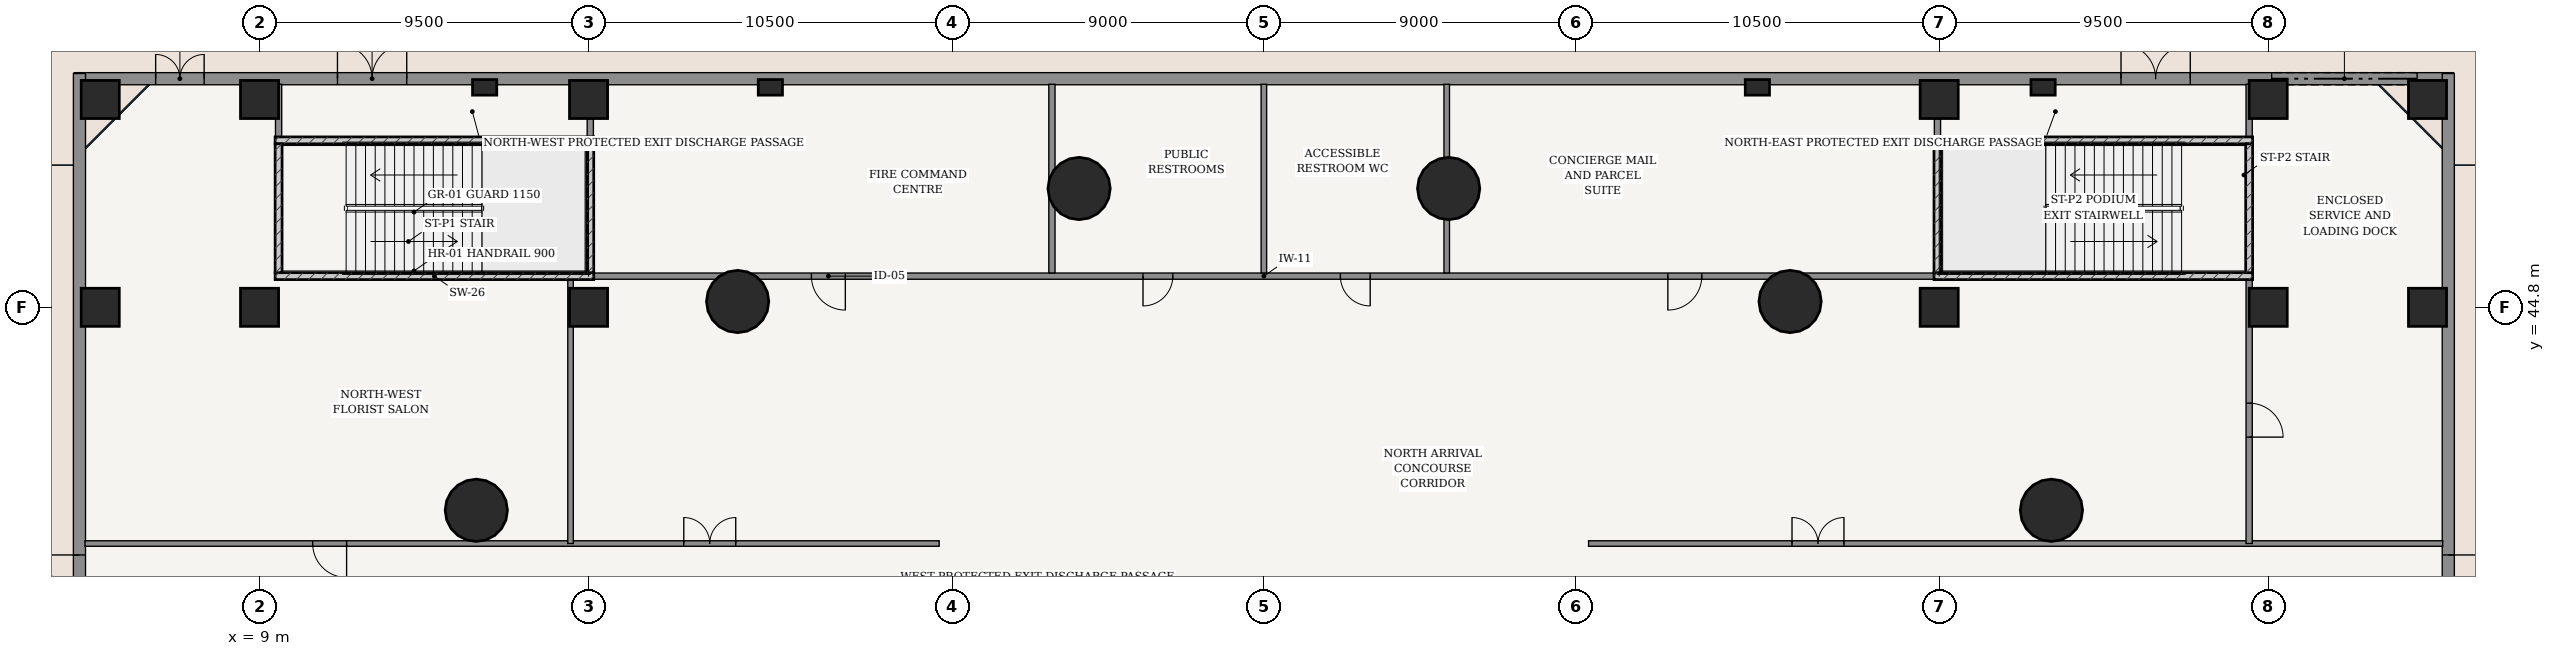
"""IFC4 building model, lengths in metres.
Left out: names, types, materials, properties, quantities, classifications, styles, units other than length and angle.
Written with IfcOpenShell. Run it as: python <this file> out.ifc"""

import sys

from ifc_helpers import new_model, si_unit, direction, frame, frame_2d, origin, origin_2d, place, context, subcontext, project, spatial, rectangle, hollow_circle, extrude, source, transform, mapped, element, fill, save


model = new_model("IFC4")
c1 = context("Model", 3, precision=1e-05, world=origin(), true_north=direction((-0.2419218956, 0.970295726276)))
c2 = subcontext(c1, "Body", "Model", "MODEL_VIEW")
j1 = project(units=[si_unit("LENGTHUNIT", "METRE"), si_unit("PLANEANGLEUNIT", "RADIAN")], contexts=[c1])
p1 = place(None, origin())
s1 = spatial("IfcSite", under=j1, at=p1, CompositionType="ELEMENT")
p2 = place(p1, origin())
s2 = spatial("IfcBuilding", under=s1, at=p2, CompositionType="ELEMENT")
p3 = place(p2, origin())
s3 = spatial("IfcBuildingStorey", under=s2, at=p3, CompositionType="ELEMENT", Elevation=0.0)
for number, where, z_axis, x_axis in (
    (1, (9.45, 45.7, 0.0), (0.0, 0.0, 1.0), (1.0, 0.0, 0.0)),
    (2, (9.45, 49.62, 0.0), (0.0, 0.0, 1.0), (1.0, 0.0, 0.0)),
):
    element("IfcWall", number, at=place(p3, frame(where, z_axis=z_axis, x_axis=x_axis)), inside=s3, PredefinedType="SOLIDWALL", context=c2, shape_type="SweptSolid", body=[
        extrude(rectangle(XDim=9.2, YDim=0.2, at=frame_2d((4.6, 0.0))), origin(), (0.0, 0.0, 1.0), 5.1),
    ])
for number, where, z_axis, x_axis in (
    (3, (9.55, 45.8, 0.0), (0.0, 0.0, 1.0), (0.0, 1.0, 0.0)),
    (4, (18.55, 45.8, 0.0), (0.0, 0.0, 1.0), (0.0, 1.0, 0.0)),
):
    element("IfcWall", number, at=place(p3, frame(where, z_axis=z_axis, x_axis=x_axis)), inside=s3, PredefinedType="SOLIDWALL", context=c2, shape_type="SweptSolid", body=[
        extrude(rectangle(XDim=3.72, YDim=0.2, at=frame_2d((1.86, 0.0))), origin(), (0.0, 0.0, 1.0), 5.1),
    ])
for number, where, z_axis, x_axis in (
    (5, (57.35, 45.7, 0.0), (0.0, 0.0, 1.0), (1.0, 0.0, 0.0)),
    (6, (57.35, 49.62, 0.0), (0.0, 0.0, 1.0), (1.0, 0.0, 0.0)),
):
    element("IfcWall", number, at=place(p3, frame(where, z_axis=z_axis, x_axis=x_axis)), inside=s3, PredefinedType="SOLIDWALL", context=c2, shape_type="SweptSolid", body=[
        extrude(rectangle(XDim=9.2, YDim=0.2, at=frame_2d((4.6, 0.0))), origin(), (0.0, 0.0, 1.0), 5.1),
    ])
for number, where, z_axis, x_axis in (
    (7, (57.45, 45.8, 0.0), (0.0, 0.0, 1.0), (0.0, 1.0, 0.0)),
    (8, (66.45, 45.8, 0.0), (0.0, 0.0, 1.0), (0.0, 1.0, 0.0)),
):
    element("IfcWall", number, at=place(p3, frame(where, z_axis=z_axis, x_axis=x_axis)), inside=s3, PredefinedType="SOLIDWALL", context=c2, shape_type="SweptSolid", body=[
        extrude(rectangle(XDim=3.72, YDim=0.2, at=frame_2d((1.86, 0.0))), origin(), (0.0, 0.0, 1.0), 5.1),
    ])
for number, where, z_axis, x_axis in (
    (9, (60.741, 38.939, 0.0), (0.0, 0.0, 1.0), (1.0, 0.0, 0.0)),
    (10, (53.195, 44.968, 0.0), (0.0, 0.0, 1.0), (1.0, 0.0, 0.0)),
    (11, (43.336, 48.23, 0.0), (0.0, 0.0, 1.0), (1.0, 0.0, 0.0)),
    (12, (32.664, 48.23, 0.0), (0.0, 0.0, 1.0), (1.0, 0.0, 0.0)),
    (13, (22.805, 44.968, 0.0), (0.0, 0.0, 1.0), (1.0, 0.0, 0.0)),
    (14, (15.259, 38.939, 0.0), (0.0, 0.0, 1.0), (1.0, 0.0, 0.0)),
):
    element("IfcColumn", number, at=place(p3, frame(where, z_axis=z_axis, x_axis=x_axis)), inside=s3, PredefinedType="COLUMN", context=c2, shape_type="SweptSolid", body=[
        extrude(hollow_circle(Radius=0.9, WallThickness=0.055, at=origin_2d()), origin(), (0.0, 0.0, 1.0), 5.4),
    ])
for number, where, z_axis, x_axis in (
    (15, (4.4, 44.8, 0.0), (0.0, 0.0, 1.0), (1.0, 0.0, 0.0)),
    (16, (4.4, 50.8, 0.0), (0.0, 0.0, 1.0), (1.0, 0.0, 0.0)),
    (17, (9.0, 44.8, 0.0), (0.0, 0.0, 1.0), (1.0, 0.0, 0.0)),
    (18, (9.0, 50.8, 0.0), (0.0, 0.0, 1.0), (1.0, 0.0, 0.0)),
    (19, (18.5, 44.8, 0.0), (0.0, 0.0, 1.0), (1.0, 0.0, 0.0)),
    (20, (18.5, 50.8, 0.0), (0.0, 0.0, 1.0), (1.0, 0.0, 0.0)),
    (21, (57.5, 44.8, 0.0), (0.0, 0.0, 1.0), (1.0, 0.0, 0.0)),
    (22, (57.5, 50.8, 0.0), (0.0, 0.0, 1.0), (1.0, 0.0, 0.0)),
    (23, (67.0, 44.8, 0.0), (0.0, 0.0, 1.0), (1.0, 0.0, 0.0)),
    (24, (67.0, 50.8, 0.0), (0.0, 0.0, 1.0), (1.0, 0.0, 0.0)),
    (25, (71.6, 44.8, 0.0), (0.0, 0.0, 1.0), (1.0, 0.0, 0.0)),
    (26, (71.6, 50.8, 0.0), (0.0, 0.0, 1.0), (1.0, 0.0, 0.0)),
):
    element("IfcColumn", number, at=place(p3, frame(where, z_axis=z_axis, x_axis=x_axis)), inside=s3, PredefinedType="COLUMN", context=c2, shape_type="SweptSolid", body=[
        extrude(rectangle(XDim=1.1, YDim=1.1, at=origin_2d()), origin(), (0.0, 0.0, 1.0), 5.4),
    ])
for number, where, z_axis, x_axis in (
    (27, (15.5, 51.15, 0.0), (0.0, 0.0, 1.0), (1.0, 0.0, 0.0)),
    (28, (23.75, 51.15, 0.0), (0.0, 0.0, 1.0), (1.0, 0.0, 0.0)),
    (29, (52.25, 51.15, 0.0), (0.0, 0.0, 1.0), (1.0, 0.0, 0.0)),
    (30, (60.5, 51.15, 0.0), (0.0, 0.0, 1.0), (1.0, 0.0, 0.0)),
):
    element("IfcColumn", number, at=place(p3, frame(where, z_axis=z_axis, x_axis=x_axis)), inside=s3, PredefinedType="PILASTER", context=c2, shape_type="SweptSolid", body=[
        extrude(rectangle(XDim=0.7, YDim=0.45, at=origin_2d()), origin(), (0.0, 0.0, 1.0), 5.4),
    ])
p4 = place(p3, frame((72.35, 51.4, 0.0), z_axis=(0.0, 0.0, 1.0), x_axis=(-1.0, 0.0, 0.0)))
e31 = element("IfcWall", 31, at=p4, inside=s3, PredefinedType="SOLIDWALL", context=c2, shape_type="SweptSolid", body=[
    extrude(rectangle(XDim=68.7, YDim=0.35, at=frame_2d((34.35, 0.0))), origin(), (0.0, 0.0, 1.0), 5.1),
])
p5 = place(p4, frame((1.05, 0.0, 0.0)))
e32 = element("IfcOpeningElement", 32, at=p5, cuts=e31, PredefinedType="OPENING", context=c2, shape_type="SweptSolid", body=[
    extrude(rectangle(XDim=4.2, YDim=3.4, at=frame_2d((2.1, 1.7))), frame((0.0, 0.185, 0.0), z_axis=(0.0, -1.0, 0.0), x_axis=(1.0, 0.0, 0.0)), (0.0, 0.0, 1.0), 0.37),
])
p6 = place(p4, frame((64.95, 0.0, 0.0)))
e33 = element("IfcOpeningElement", 33, at=p6, cuts=e31, PredefinedType="OPENING", context=c2, shape_type="SweptSolid", body=[
    extrude(rectangle(XDim=1.4, YDim=2.4, at=frame_2d((0.7, 1.2))), frame((0.0, 0.185, 0.0), z_axis=(0.0, -1.0, 0.0), x_axis=(1.0, 0.0, 0.0)), (0.0, 0.0, 1.0), 0.37),
])
p7 = place(p4, frame((59.1, 0.0, 0.0)))
e34 = element("IfcOpeningElement", 34, at=p7, cuts=e31, PredefinedType="OPENING", context=c2, shape_type="SweptSolid", body=[
    extrude(rectangle(XDim=2.0, YDim=2.2, at=frame_2d((1.0, 1.1))), frame((0.0, 0.185, 0.0), z_axis=(0.0, -1.0, 0.0), x_axis=(1.0, 0.0, 0.0)), (0.0, 0.0, 1.0), 0.37),
])
p8 = place(p4, frame((7.6, 0.0, 0.0)))
e35 = element("IfcOpeningElement", 35, at=p8, cuts=e31, PredefinedType="OPENING", context=c2, shape_type="SweptSolid", body=[
    extrude(rectangle(XDim=2.0, YDim=2.2, at=frame_2d((1.0, 1.1))), frame((0.0, 0.185, 0.0), z_axis=(0.0, -1.0, 0.0), x_axis=(1.0, 0.0, 0.0)), (0.0, 0.0, 1.0), 0.37),
])
p9 = place(p3, frame((3.8, 51.55, 0.0), z_axis=(0.0, 0.0, 1.0), x_axis=(0.0, -1.0, 0.0)))
e36 = element("IfcWall", 36, at=p9, inside=s3, PredefinedType="SOLIDWALL", context=c2, shape_type="SweptSolid", body=[
    extrude(rectangle(XDim=49.5, YDim=0.35, at=frame_2d((24.75, 0.0))), origin(), (0.0, 0.0, 1.0), 5.1),
])
p10 = place(p9, frame((13.9, 0.0, 0.0)))
e37 = element("IfcOpeningElement", 37, at=p10, cuts=e36, PredefinedType="OPENING", context=c2, shape_type="SweptSolid", body=[
    extrude(rectangle(XDim=2.0, YDim=2.2, at=frame_2d((1.0, 1.1))), frame((0.0, 0.185, 0.0), z_axis=(0.0, -1.0, 0.0), x_axis=(1.0, 0.0, 0.0)), (0.0, 0.0, 1.0), 0.37),
])
p11 = place(p3, frame((72.2, 2.05, 0.0), z_axis=(0.0, 0.0, 1.0), x_axis=(0.0, 1.0, 0.0)))
e38 = element("IfcWall", 38, at=p11, inside=s3, PredefinedType="SOLIDWALL", context=c2, shape_type="SweptSolid", body=[
    extrude(rectangle(XDim=49.5, YDim=0.35, at=frame_2d((24.75, 0.0))), origin(), (0.0, 0.0, 1.0), 5.1),
])
p12 = place(p11, frame((33.6, 0.0, 0.0)))
e39 = element("IfcOpeningElement", 39, at=p12, cuts=e38, PredefinedType="OPENING", context=c2, shape_type="SweptSolid", body=[
    extrude(rectangle(XDim=2.0, YDim=2.2, at=frame_2d((1.0, 1.1))), frame((0.0, 0.185, 0.0), z_axis=(0.0, -1.0, 0.0), x_axis=(1.0, 0.0, 0.0)), (0.0, 0.0, 1.0), 0.37),
])
p13 = place(p3, frame((3.96, 37.98, 0.0), z_axis=(0.0, 0.0, 1.0), x_axis=(1.0, 0.0, 0.0)))
e40 = element("IfcWall", 40, at=p13, inside=s3, PredefinedType="PARTITIONING", context=c2, shape_type="SweptSolid", body=[
    extrude(rectangle(XDim=24.665, YDim=0.16, at=frame_2d((12.333, 0.0))), origin(), (0.0, 0.0, 1.0), 4.135),
])
p14 = place(p13, frame((17.29, 0.0, 0.0)))
e41 = element("IfcOpeningElement", 41, at=p14, cuts=e40, PredefinedType="OPENING", context=c2, shape_type="SweptSolid", body=[
    extrude(rectangle(XDim=1.5, YDim=2.2, at=frame_2d((0.75, 1.1))), frame((0.0, 0.09, 0.0), z_axis=(0.0, -1.0, 0.0), x_axis=(1.0, 0.0, 0.0)), (0.0, 0.0, 1.0), 0.18),
])
p15 = place(p13, frame((6.574, 0.0, 0.0)))
e42 = element("IfcOpeningElement", 42, at=p15, cuts=e40, PredefinedType="OPENING", context=c2, shape_type="SweptSolid", body=[
    extrude(rectangle(XDim=0.98, YDim=2.2, at=frame_2d((0.49, 1.1))), frame((0.0, 0.09, 0.0), z_axis=(0.0, -1.0, 0.0), x_axis=(1.0, 0.0, 0.0)), (0.0, 0.0, 1.0), 0.18),
])
p16 = place(p3, frame((47.375, 37.98, 0.0), z_axis=(0.0, 0.0, 1.0), x_axis=(1.0, 0.0, 0.0)))
e43 = element("IfcWall", 43, at=p16, inside=s3, PredefinedType="PARTITIONING", context=c2, shape_type="SweptSolid", body=[
    extrude(rectangle(XDim=24.665, YDim=0.16, at=frame_2d((12.333, 0.0))), origin(), (0.0, 0.0, 1.0), 4.135),
])
p17 = place(p16, frame((5.875, 0.0, 0.0)))
e44 = element("IfcOpeningElement", 44, at=p17, cuts=e43, PredefinedType="OPENING", context=c2, shape_type="SweptSolid", body=[
    extrude(rectangle(XDim=1.5, YDim=2.2, at=frame_2d((0.75, 1.1))), frame((0.0, 0.09, 0.0), z_axis=(0.0, -1.0, 0.0), x_axis=(1.0, 0.0, 0.0)), (0.0, 0.0, 1.0), 0.18),
])
for number, where, z_axis, x_axis in (
    (45, (9.55, 49.62, 0.0), (0.0, 0.0, 1.0), (0.0, 1.0, 0.0)),
    (46, (18.55, 49.62, 0.0), (0.0, 0.0, 1.0), (0.0, 1.0, 0.0)),
    (47, (57.45, 49.62, 0.0), (0.0, 0.0, 1.0), (0.0, 1.0, 0.0)),
    (48, (66.45, 49.62, 0.0), (0.0, 0.0, 1.0), (0.0, 1.0, 0.0)),
):
    element("IfcWall", number, at=place(p3, frame(where, z_axis=z_axis, x_axis=x_axis)), inside=s3, PredefinedType="PARTITIONING", context=c2, shape_type="SweptSolid", body=[
        extrude(rectangle(XDim=1.62, YDim=0.18, at=frame_2d((0.81, 0.0))), origin(), (0.0, 0.0, 1.0), 4.135),
    ])
p18 = place(p3, frame((18.55, 45.7, 0.0), z_axis=(0.0, 0.0, 1.0), x_axis=(1.0, 0.0, 0.0)))
e49 = element("IfcWall", 49, at=p18, inside=s3, PredefinedType="PARTITIONING", context=c2, shape_type="SweptSolid", body=[
    extrude(rectangle(XDim=38.9, YDim=0.18, at=frame_2d((19.45, 0.0))), origin(), (0.0, 0.0, 1.0), 4.45),
])
p19 = place(p18, frame((6.385, 0.0, 0.0)))
e50 = element("IfcOpeningElement", 50, at=p19, cuts=e49, PredefinedType="OPENING", context=c2, shape_type="SweptSolid", body=[
    extrude(rectangle(XDim=0.98, YDim=2.2, at=frame_2d((0.49, 1.1))), frame((0.0, 0.1, 0.0), z_axis=(0.0, -1.0, 0.0), x_axis=(1.0, 0.0, 0.0)), (0.0, 0.0, 1.0), 0.2),
])
p20 = place(p18, frame((15.96, 0.0, 0.0)))
e51 = element("IfcOpeningElement", 51, at=p20, cuts=e49, PredefinedType="OPENING", context=c2, shape_type="SweptSolid", body=[
    extrude(rectangle(XDim=0.86, YDim=2.1, at=frame_2d((0.43, 1.05))), frame((0.0, 0.1, 0.0), z_axis=(0.0, -1.0, 0.0), x_axis=(1.0, 0.0, 0.0)), (0.0, 0.0, 1.0), 0.2),
])
p21 = place(p18, frame((21.66, 0.0, 0.0)))
e52 = element("IfcOpeningElement", 52, at=p21, cuts=e49, PredefinedType="OPENING", context=c2, shape_type="SweptSolid", body=[
    extrude(rectangle(XDim=0.86, YDim=2.1, at=frame_2d((0.43, 1.05))), frame((0.0, 0.1, 0.0), z_axis=(0.0, -1.0, 0.0), x_axis=(1.0, 0.0, 0.0)), (0.0, 0.0, 1.0), 0.2),
])
p22 = place(p18, frame((31.115, 0.0, 0.0)))
e53 = element("IfcOpeningElement", 53, at=p22, cuts=e49, PredefinedType="OPENING", context=c2, shape_type="SweptSolid", body=[
    extrude(rectangle(XDim=0.98, YDim=2.2, at=frame_2d((0.49, 1.1))), frame((0.0, 0.1, 0.0), z_axis=(0.0, -1.0, 0.0), x_axis=(1.0, 0.0, 0.0)), (0.0, 0.0, 1.0), 0.2),
])
p23 = place(p3, frame((31.88, 45.792, 0.0), z_axis=(0.0, 0.0, 1.0), x_axis=(0.0, 1.0, 0.0)))
e54 = element("IfcWall", 54, at=p23, inside=s3, PredefinedType="PARTITIONING", context=c2, shape_type="SweptSolid", body=[
    extrude(rectangle(XDim=5.448, YDim=0.18, at=frame_2d((2.724, 0.0))), origin(), (0.0, 0.0, 1.0), 4.542),
])
p24 = place(p3, frame((38.0, 45.792, 0.0), z_axis=(0.0, 0.0, 1.0), x_axis=(0.0, 1.0, 0.0)))
e55 = element("IfcWall", 55, at=p24, inside=s3, PredefinedType="PARTITIONING", context=c2, shape_type="SweptSolid", body=[
    extrude(rectangle(XDim=5.448, YDim=0.16, at=frame_2d((2.724, 0.0))), origin(), (0.0, 0.0, 1.0), 4.542),
])
p25 = place(p3, frame((43.28, 45.792, 0.0), z_axis=(0.0, 0.0, 1.0), x_axis=(0.0, 1.0, 0.0)))
e56 = element("IfcWall", 56, at=p25, inside=s3, PredefinedType="PARTITIONING", context=c2, shape_type="SweptSolid", body=[
    extrude(rectangle(XDim=5.448, YDim=0.16, at=frame_2d((2.724, 0.0))), origin(), (0.0, 0.0, 1.0), 4.45),
])
p26 = place(p3, frame((17.98, 37.98, 0.0), z_axis=(0.0, 0.0, 1.0), x_axis=(0.0, 1.0, 0.0)))
e57 = element("IfcWall", 57, at=p26, inside=s3, PredefinedType="PARTITIONING", context=c2, shape_type="SweptSolid", body=[
    extrude(rectangle(XDim=7.72, YDim=0.16, at=frame_2d((3.86, 0.0))), origin(), (0.0, 0.0, 1.0), 4.469),
])
p27 = place(p3, frame((66.45, 37.98, 0.0), z_axis=(0.0, 0.0, 1.0), x_axis=(0.0, 1.0, 0.0)))
e58 = element("IfcWall", 58, at=p27, inside=s3, PredefinedType="PARTITIONING", context=c2, shape_type="SweptSolid", body=[
    extrude(rectangle(XDim=7.72, YDim=0.18, at=frame_2d((3.86, 0.0))), origin(), (0.0, 0.0, 1.0), 4.469),
])
p28 = place(p27, frame((3.073, 0.0, 0.0)))
e59 = element("IfcOpeningElement", 59, at=p28, cuts=e58, PredefinedType="OPENING", context=c2, shape_type="SweptSolid", body=[
    extrude(rectangle(XDim=0.98, YDim=2.2, at=frame_2d((0.49, 1.1))), frame((0.0, 0.1, 0.0), z_axis=(0.0, -1.0, 0.0), x_axis=(1.0, 0.0, 0.0)), (0.0, 0.0, 1.0), 0.2),
])
m1 = source(origin(), c2, "Body", "SweptSolid", [
    extrude(rectangle(XDim=4.2, YDim=3.4, at=frame_2d((2.1, 1.7))), frame((0.0, 0.025, 0.0), z_axis=(0.0, -1.0, 0.0), x_axis=(1.0, 0.0, 0.0)), (0.0, 0.0, 1.0), 0.05),
])
p29 = place(p5, origin())
e60 = element("IfcDoor", 60, at=p29, inside=s3, OperationType="ROLLINGUP", PredefinedType="GATE", context=c2, shape_type="MappedRepresentation", body=[
    mapped(m1, transform((0.0, 0.0, 0.0), scale=1.0)),
])
fill(e32, e60)
m2 = source(origin(), c2, "Body", "SweptSolid", [
    extrude(rectangle(XDim=1.4, YDim=2.4, at=frame_2d((0.7, 1.2))), frame((0.0, 0.025, 0.0), z_axis=(0.0, -1.0, 0.0), x_axis=(1.0, 0.0, 0.0)), (0.0, 0.0, 1.0), 0.05),
])
p30 = place(p6, frame((1.4, 0.0, 0.0), z_axis=(0.0, 0.0, 1.0), x_axis=(-1.0, 0.0, 0.0)))
e61 = element("IfcDoor", 61, at=p30, inside=s3, OperationType="DOUBLE_DOOR_SINGLE_SWING", PredefinedType="DOOR", context=c2, shape_type="MappedRepresentation", body=[
    mapped(m2, transform((0.0, 0.0, 0.0), scale=1.0)),
])
fill(e33, e61)
m3 = source(origin(), c2, "Body", "SweptSolid", [
    extrude(rectangle(XDim=2.0, YDim=2.2, at=frame_2d((1.0, 1.1))), frame((0.0, 0.025, 0.0), z_axis=(0.0, -1.0, 0.0), x_axis=(1.0, 0.0, 0.0)), (0.0, 0.0, 1.0), 0.05),
])
p31 = place(p7, frame((2.0, 0.0, 0.0), z_axis=(0.0, 0.0, 1.0), x_axis=(-1.0, 0.0, 0.0)))
e62 = element("IfcDoor", 62, at=p31, inside=s3, OperationType="DOUBLE_DOOR_SINGLE_SWING", PredefinedType="DOOR", context=c2, shape_type="MappedRepresentation", body=[
    mapped(m3, transform((0.0, 0.0, 0.0), scale=1.0)),
])
fill(e34, e62)
p32 = place(p8, frame((2.0, 0.0, 0.0), z_axis=(0.0, 0.0, 1.0), x_axis=(-1.0, 0.0, 0.0)))
e63 = element("IfcDoor", 63, at=p32, inside=s3, OperationType="DOUBLE_DOOR_SINGLE_SWING", PredefinedType="DOOR", context=c2, shape_type="MappedRepresentation", body=[
    mapped(m3, transform((0.0, 0.0, 0.0), scale=1.0)),
])
fill(e35, e63)
p33 = place(p10, frame((2.0, 0.0, 0.0), z_axis=(0.0, 0.0, 1.0), x_axis=(-1.0, 0.0, 0.0)))
e64 = element("IfcDoor", 64, at=p33, inside=s3, OperationType="DOUBLE_DOOR_SINGLE_SWING", PredefinedType="DOOR", context=c2, shape_type="MappedRepresentation", body=[
    mapped(m3, transform((0.0, 0.0, 0.0), scale=1.0)),
])
fill(e37, e64)
p34 = place(p12, frame((2.0, 0.0, 0.0), z_axis=(0.0, 0.0, 1.0), x_axis=(-1.0, 0.0, 0.0)))
e65 = element("IfcDoor", 65, at=p34, inside=s3, OperationType="DOUBLE_DOOR_SINGLE_SWING", PredefinedType="DOOR", context=c2, shape_type="MappedRepresentation", body=[
    mapped(m3, transform((0.0, 0.0, 0.0), scale=1.0)),
])
fill(e39, e65)
m4 = source(origin(), c2, "Body", "SweptSolid", [
    extrude(rectangle(XDim=1.5, YDim=2.2, at=frame_2d((0.75, 1.1))), frame((0.0, 0.025, 0.0), z_axis=(0.0, -1.0, 0.0), x_axis=(1.0, 0.0, 0.0)), (0.0, 0.0, 1.0), 0.05),
])
p35 = place(p14, origin())
e66 = element("IfcDoor", 66, at=p35, inside=s3, OperationType="DOUBLE_DOOR_SINGLE_SWING", PredefinedType="DOOR", context=c2, shape_type="MappedRepresentation", body=[
    mapped(m4, transform((0.0, 0.0, 0.0), scale=1.0)),
])
fill(e41, e66)
p36 = place(p17, origin())
e67 = element("IfcDoor", 67, at=p36, inside=s3, OperationType="DOUBLE_DOOR_SINGLE_SWING", PredefinedType="DOOR", context=c2, shape_type="MappedRepresentation", body=[
    mapped(m4, transform((0.0, 0.0, 0.0), scale=1.0)),
])
fill(e44, e67)
m5 = source(origin(), c2, "Body", "SweptSolid", [
    extrude(rectangle(XDim=0.98, YDim=2.2, at=frame_2d((0.49, 1.1))), frame((0.0, 0.025, 0.0), z_axis=(0.0, -1.0, 0.0), x_axis=(1.0, 0.0, 0.0)), (0.0, 0.0, 1.0), 0.05),
])
p37 = place(p19, frame((0.98, 0.0, 0.0), z_axis=(0.0, 0.0, 1.0), x_axis=(-1.0, 0.0, 0.0)))
e68 = element("IfcDoor", 68, at=p37, inside=s3, OperationType="SINGLE_SWING_LEFT", PredefinedType="DOOR", context=c2, shape_type="MappedRepresentation", body=[
    mapped(m5, transform((0.0, 0.0, 0.0), scale=1.0)),
])
fill(e50, e68)
m6 = source(origin(), c2, "Body", "SweptSolid", [
    extrude(rectangle(XDim=0.86, YDim=2.1, at=frame_2d((0.43, 1.05))), frame((0.0, 0.025, 0.0), z_axis=(0.0, -1.0, 0.0), x_axis=(1.0, 0.0, 0.0)), (0.0, 0.0, 1.0), 0.05),
])
p38 = place(p20, frame((0.86, 0.0, 0.0), z_axis=(0.0, 0.0, 1.0), x_axis=(-1.0, 0.0, 0.0)))
e69 = element("IfcDoor", 69, at=p38, inside=s3, OperationType="SINGLE_SWING_RIGHT", PredefinedType="DOOR", context=c2, shape_type="MappedRepresentation", body=[
    mapped(m6, transform((0.0, 0.0, 0.0), scale=1.0)),
])
fill(e51, e69)
p39 = place(p21, frame((0.86, 0.0, 0.0), z_axis=(0.0, 0.0, 1.0), x_axis=(-1.0, 0.0, 0.0)))
e70 = element("IfcDoor", 70, at=p39, inside=s3, OperationType="SINGLE_SWING_LEFT", PredefinedType="DOOR", context=c2, shape_type="MappedRepresentation", body=[
    mapped(m6, transform((0.0, 0.0, 0.0), scale=1.0)),
])
fill(e52, e70)
p40 = place(p22, frame((0.98, 0.0, 0.0), z_axis=(0.0, 0.0, 1.0), x_axis=(-1.0, 0.0, 0.0)))
e71 = element("IfcDoor", 71, at=p40, inside=s3, OperationType="SINGLE_SWING_RIGHT", PredefinedType="DOOR", context=c2, shape_type="MappedRepresentation", body=[
    mapped(m5, transform((0.0, 0.0, 0.0), scale=1.0)),
])
fill(e53, e71)
p41 = place(p15, frame((0.98, 0.0, 0.0), z_axis=(0.0, 0.0, 1.0), x_axis=(-1.0, 0.0, 0.0)))
e72 = element("IfcDoor", 72, at=p41, inside=s3, OperationType="SINGLE_SWING_LEFT", PredefinedType="DOOR", context=c2, shape_type="MappedRepresentation", body=[
    mapped(m5, transform((0.0, 0.0, 0.0), scale=1.0)),
])
fill(e42, e72)
p42 = place(p28, frame((0.98, 0.0, 0.0), z_axis=(0.0, 0.0, 1.0), x_axis=(-1.0, 0.0, 0.0)))
e73 = element("IfcDoor", 73, at=p42, inside=s3, OperationType="SINGLE_SWING_RIGHT", PredefinedType="DOOR", context=c2, shape_type="MappedRepresentation", body=[
    mapped(m5, transform((0.0, 0.0, 0.0), scale=1.0)),
])
fill(e59, e73)
save(model, sys.argv[1])
